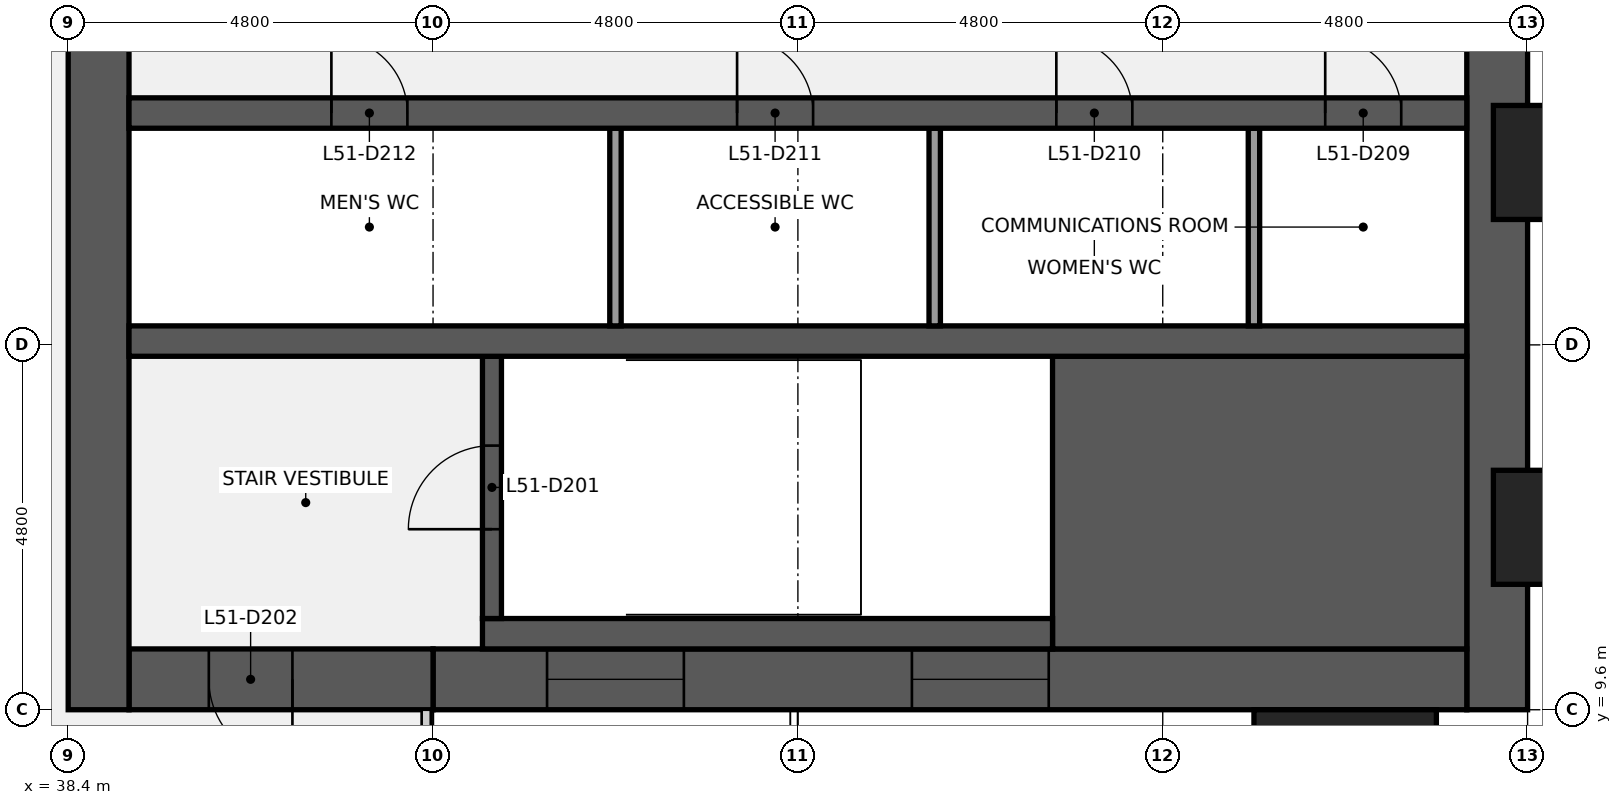
"""IFC4 building model, lengths in metres.
Left out: names, types, materials, properties, quantities, classifications, styles, units other than length and angle.
Written with IfcOpenShell. Run it as: python <this file> out.ifc"""

import sys

from ifc_helpers import new_model, si_unit, direction, frame, frame_2d, origin, origin_2d, place, context, subcontext, project, spatial, rectangle, extrude, element, fill, save


model = new_model("IFC4")
c1 = context("Model", 3, precision=1e-05, world=origin(), true_north=direction((0.0, 1.0)))
c2 = subcontext(c1, "Body", "Model", "MODEL_VIEW")
j1 = project(units=[si_unit("LENGTHUNIT", "METRE"), si_unit("PLANEANGLEUNIT", "RADIAN")], contexts=[c1])
p1 = place(None, origin())
s1 = spatial("IfcSite", under=j1, at=p1, CompositionType="ELEMENT")
p2 = place(p1, origin())
s2 = spatial("IfcBuilding", under=s1, at=p2, CompositionType="ELEMENT")
p3 = place(p2, frame((0.0, 0.0, 233.2)))
s3 = spatial("IfcBuildingStorey", under=s2, at=p3, CompositionType="ELEMENT", Elevation=233.2)
p4 = place(p3, frame((57.2, 38.4, 0.0), z_axis=(0.0, 0.0, 1.0), x_axis=(0.0, -1.0, 0.0)))
e1 = element("IfcWall", 1, at=p4, inside=s3, PredefinedType="SHEAR", context=c2, shape_type="SweptSolid", body=[
    extrude(rectangle(XDim=28.8, YDim=0.8, at=frame_2d((14.4, 0.0))), origin(), (0.0, 0.0, 1.0), 3.84),
])
p5 = place(p4, frame((18.45, 0.0, 0.9)))
e2 = element("IfcOpeningElement", 2, at=p5, cuts=e1, PredefinedType="OPENING", context=c2, shape_type="SweptSolid", body=[
    extrude(rectangle(XDim=1.5, YDim=1.5, at=frame_2d((0.75, 0.75))), frame((0.0, 0.41, 0.0), z_axis=(0.0, -1.0, 0.0), x_axis=(1.0, 0.0, 0.0)), (0.0, 0.0, 1.0), 0.82),
])
p6 = place(p4, frame((8.85, 0.0, 0.9)))
e3 = element("IfcOpeningElement", 3, at=p6, cuts=e1, PredefinedType="OPENING", context=c2, shape_type="SweptSolid", body=[
    extrude(rectangle(XDim=1.5, YDim=1.5, at=frame_2d((0.75, 0.75))), frame((0.0, 0.41, 0.0), z_axis=(0.0, -1.0, 0.0), x_axis=(1.0, 0.0, 0.0)), (0.0, 0.0, 1.0), 0.82),
])
p7 = place(p3, frame((56.8, 10.0, 0.0), z_axis=(0.0, 0.0, 1.0), x_axis=(-1.0, 0.0, 0.0)))
e4 = element("IfcWall", 4, at=p7, inside=s3, PredefinedType="SHEAR", context=c2, shape_type="SweptSolid", body=[
    extrude(rectangle(XDim=13.6, YDim=0.8, at=frame_2d((6.8, 0.0))), origin(), (0.0, 0.0, 1.0), 3.84),
])
p8 = place(p7, frame((5.5, 0.0, 0.9)))
e5 = element("IfcOpeningElement", 5, at=p8, cuts=e4, PredefinedType="OPENING", context=c2, shape_type="SweptSolid", body=[
    extrude(rectangle(XDim=1.8, YDim=1.5, at=frame_2d((0.9, 0.75))), frame((0.0, 0.41, 0.0), z_axis=(0.0, -1.0, 0.0), x_axis=(1.0, 0.0, 0.0)), (0.0, 0.0, 1.0), 0.82),
])
p9 = place(p7, frame((10.3, 0.0, 0.9)))
e6 = element("IfcOpeningElement", 6, at=p9, cuts=e4, PredefinedType="OPENING", context=c2, shape_type="SweptSolid", body=[
    extrude(rectangle(XDim=1.8, YDim=1.5, at=frame_2d((0.9, 0.75))), frame((0.0, 0.41, 0.0), z_axis=(0.0, -1.0, 0.0), x_axis=(1.0, 0.0, 0.0)), (0.0, 0.0, 1.0), 0.82),
])
p10 = place(p3, frame((43.2, 10.0, 0.0), z_axis=(0.0, 0.0, 1.0), x_axis=(-1.0, 0.0, 0.0)))
e7 = element("IfcWall", 7, at=p10, inside=s3, PredefinedType="SHEAR", context=c2, shape_type="SweptSolid", body=[
    extrude(rectangle(XDim=4.0, YDim=0.8, at=frame_2d((2.0, 0.0))), origin(), (0.0, 0.0, 1.0), 3.84),
])
p11 = place(p10, frame((1.85, 0.0, 0.0)))
e8 = element("IfcOpeningElement", 8, at=p11, cuts=e7, PredefinedType="OPENING", context=c2, shape_type="SweptSolid", body=[
    extrude(rectangle(XDim=1.1, YDim=2.1, at=frame_2d((0.55, 1.05))), frame((0.0, 0.41, 0.0), z_axis=(0.0, -1.0, 0.0), x_axis=(1.0, 0.0, 0.0)), (0.0, 0.0, 1.0), 0.82),
])
p12 = place(p3, frame((38.8, 9.6, 0.0), z_axis=(0.0, 0.0, 1.0), x_axis=(0.0, 1.0, 0.0)))
e9 = element("IfcWall", 9, at=p12, inside=s3, PredefinedType="SHEAR", context=c2, shape_type="SweptSolid", body=[
    extrude(rectangle(XDim=28.8, YDim=0.8, at=frame_2d((14.4, 0.0))), origin(), (0.0, 0.0, 1.0), 3.84),
])
p13 = place(p12, frame((8.7, 0.0, 0.0)))
e10 = element("IfcOpeningElement", 10, at=p13, cuts=e9, PredefinedType="OPENING", context=c2, shape_type="SweptSolid", body=[
    extrude(rectangle(XDim=1.8, YDim=2.1, at=frame_2d((0.9, 1.05))), frame((0.0, 0.41, 0.0), z_axis=(0.0, -1.0, 0.0), x_axis=(1.0, 0.0, 0.0)), (0.0, 0.0, 1.0), 0.82),
])
p14 = place(p12, frame((18.3, 0.0, 0.0)))
e11 = element("IfcOpeningElement", 11, at=p14, cuts=e9, PredefinedType="OPENING", context=c2, shape_type="SweptSolid", body=[
    extrude(rectangle(XDim=1.8, YDim=2.1, at=frame_2d((0.9, 1.05))), frame((0.0, 0.41, 0.0), z_axis=(0.0, -1.0, 0.0), x_axis=(1.0, 0.0, 0.0)), (0.0, 0.0, 1.0), 0.82),
])
p15 = place(p3, frame((51.35, 12.325, 0.0), z_axis=(0.0, 0.0, 1.0), x_axis=(1.0, 0.0, 0.0)))
e12 = element("IfcWall", 12, at=p15, inside=s3, PredefinedType="SHEAR", context=c2, shape_type="SweptSolid", body=[
    extrude(rectangle(XDim=5.45, YDim=3.85, at=frame_2d((2.725, 0.0))), origin(), (0.0, 0.0, 1.0), 3.84),
])
p16 = place(p3, frame((43.85, 10.6, 0.0), z_axis=(0.0, 0.0, 1.0), x_axis=(1.0, 0.0, 0.0)))
e13 = element("IfcWall", 13, at=p16, inside=s3, PredefinedType="SHEAR", context=c2, shape_type="SweptSolid", body=[
    extrude(rectangle(XDim=7.5, YDim=0.4, at=frame_2d((3.75, 0.0))), origin(), (0.0, 0.0, 1.0), 3.84),
])
p17 = place(p3, frame((43.975, 10.8, 0.0), z_axis=(0.0, 0.0, 1.0), x_axis=(0.0, 1.0, 0.0)))
e14 = element("IfcWall", 14, at=p17, inside=s3, PredefinedType="SHEAR", context=c2, shape_type="SweptSolid", body=[
    extrude(rectangle(XDim=3.45, YDim=0.25, at=frame_2d((1.725, 0.0))), origin(), (0.0, 0.0, 1.0), 3.84),
])
p18 = place(p17, frame((1.175, 0.0, 0.0)))
e15 = element("IfcOpeningElement", 15, at=p18, cuts=e14, PredefinedType="OPENING", context=c2, shape_type="SweptSolid", body=[
    extrude(rectangle(XDim=1.1, YDim=2.1, at=frame_2d((0.55, 1.05))), frame((0.0, 0.135, 0.0), z_axis=(0.0, -1.0, 0.0), x_axis=(1.0, 0.0, 0.0)), (0.0, 0.0, 1.0), 0.27),
])
p19 = place(p3, frame((39.2, 14.45, 0.0), z_axis=(0.0, 0.0, 1.0), x_axis=(1.0, 0.0, 0.0)))
e16 = element("IfcWall", 16, at=p19, inside=s3, PredefinedType="SHEAR", context=c2, shape_type="SweptSolid", body=[
    extrude(rectangle(XDim=17.6, YDim=0.4, at=frame_2d((8.8, 0.0))), origin(), (0.0, 0.0, 1.0), 3.84),
])
for number, where, z_axis, x_axis in (
    (17, (54.0, 14.65, 0.0), (0.0, 0.0, 1.0), (0.0, 1.0, 0.0)),
    (18, (49.8, 14.65, 0.0), (0.0, 0.0, 1.0), (0.0, 1.0, 0.0)),
    (19, (45.6, 14.65, 0.0), (0.0, 0.0, 1.0), (0.0, 1.0, 0.0)),
):
    element("IfcWall", number, at=place(p3, frame(where, z_axis=z_axis, x_axis=x_axis)), inside=s3, PredefinedType="PARTITIONING", context=c2, shape_type="SweptSolid", body=[
        extrude(rectangle(XDim=2.6, YDim=0.15, at=frame_2d((1.3, 0.0))), origin(), (0.0, 0.0, 1.0), 3.84),
    ])
p20 = place(p3, frame((39.2, 17.45, 0.0), z_axis=(0.0, 0.0, 1.0), x_axis=(1.0, 0.0, 0.0)))
e20 = element("IfcWall", 20, at=p20, inside=s3, PredefinedType="SHEAR", context=c2, shape_type="SweptSolid", body=[
    extrude(rectangle(XDim=17.6, YDim=0.4, at=frame_2d((8.8, 0.0))), origin(), (0.0, 0.0, 1.0), 3.84),
])
p21 = place(p20, frame((15.738, 0.0, 0.0)))
e21 = element("IfcOpeningElement", 21, at=p21, cuts=e20, PredefinedType="OPENING", context=c2, shape_type="SweptSolid", body=[
    extrude(rectangle(XDim=1.0, YDim=2.1, at=frame_2d((0.5, 1.05))), frame((0.0, 0.21, 0.0), z_axis=(0.0, -1.0, 0.0), x_axis=(1.0, 0.0, 0.0)), (0.0, 0.0, 1.0), 0.42),
])
p22 = place(p20, frame((12.2, 0.0, 0.0)))
e22 = element("IfcOpeningElement", 22, at=p22, cuts=e20, PredefinedType="OPENING", context=c2, shape_type="SweptSolid", body=[
    extrude(rectangle(XDim=1.0, YDim=2.1, at=frame_2d((0.5, 1.05))), frame((0.0, 0.21, 0.0), z_axis=(0.0, -1.0, 0.0), x_axis=(1.0, 0.0, 0.0)), (0.0, 0.0, 1.0), 0.42),
])
p23 = place(p20, frame((8.0, 0.0, 0.0)))
e23 = element("IfcOpeningElement", 23, at=p23, cuts=e20, PredefinedType="OPENING", context=c2, shape_type="SweptSolid", body=[
    extrude(rectangle(XDim=1.0, YDim=2.1, at=frame_2d((0.5, 1.05))), frame((0.0, 0.21, 0.0), z_axis=(0.0, -1.0, 0.0), x_axis=(1.0, 0.0, 0.0)), (0.0, 0.0, 1.0), 0.42),
])
p24 = place(p20, frame((2.663, 0.0, 0.0)))
e24 = element("IfcOpeningElement", 24, at=p24, cuts=e20, PredefinedType="OPENING", context=c2, shape_type="SweptSolid", body=[
    extrude(rectangle(XDim=1.0, YDim=2.1, at=frame_2d((0.5, 1.05))), frame((0.0, 0.21, 0.0), z_axis=(0.0, -1.0, 0.0), x_axis=(1.0, 0.0, 0.0)), (0.0, 0.0, 1.0), 0.42),
])
for number, where, z_axis, x_axis in (
    (25, (55.2, 8.85, 0.0), (0.0, 0.0, 1.0), (1.0, 0.0, 0.0)),
    (26, (58.35, 12.0, 0.0), (0.0, 0.0, 1.0), (0.0, 1.0, 0.0)),
    (27, (58.35, 16.8, 0.0), (0.0, 0.0, 1.0), (0.0, 1.0, 0.0)),
):
    element("IfcColumn", number, at=place(p3, frame(where, z_axis=z_axis, x_axis=x_axis)), inside=s3, PredefinedType="PILASTER", context=c2, shape_type="SweptSolid", body=[
        extrude(rectangle(XDim=2.4, YDim=1.5, at=origin_2d()), origin(), (0.0, 0.0, 1.0), 4.0),
    ])
p25 = place(p18, origin())
e28 = element("IfcDoor", 28, at=p25, inside=s3, OperationType="SINGLE_SWING_LEFT", PredefinedType="DOOR", context=c2, shape_type="SweptSolid", body=[
    extrude(rectangle(XDim=1.1, YDim=2.1, at=frame_2d((0.55, 1.05))), frame((0.0, 0.025, 0.0), z_axis=(0.0, -1.0, 0.0), x_axis=(1.0, 0.0, 0.0)), (0.0, 0.0, 1.0), 0.05),
])
fill(e15, e28)
p26 = place(p11, origin())
e29 = element("IfcDoor", 29, at=p26, inside=s3, OperationType="SINGLE_SWING_LEFT", PredefinedType="DOOR", context=c2, shape_type="SweptSolid", body=[
    extrude(rectangle(XDim=1.1, YDim=2.1, at=frame_2d((0.55, 1.05))), frame((0.0, 0.025, 0.0), z_axis=(0.0, -1.0, 0.0), x_axis=(1.0, 0.0, 0.0)), (0.0, 0.0, 1.0), 0.05),
])
fill(e8, e29)
p27 = place(p21, origin())
e30 = element("IfcDoor", 30, at=p27, inside=s3, OperationType="SINGLE_SWING_LEFT", PredefinedType="DOOR", context=c2, shape_type="SweptSolid", body=[
    extrude(rectangle(XDim=1.0, YDim=2.1, at=frame_2d((0.5, 1.05))), frame((0.0, 0.025, 0.0), z_axis=(0.0, -1.0, 0.0), x_axis=(1.0, 0.0, 0.0)), (0.0, 0.0, 1.0), 0.05),
])
fill(e21, e30)
p28 = place(p22, origin())
e31 = element("IfcDoor", 31, at=p28, inside=s3, OperationType="SINGLE_SWING_LEFT", PredefinedType="DOOR", context=c2, shape_type="SweptSolid", body=[
    extrude(rectangle(XDim=1.0, YDim=2.1, at=frame_2d((0.5, 1.05))), frame((0.0, 0.025, 0.0), z_axis=(0.0, -1.0, 0.0), x_axis=(1.0, 0.0, 0.0)), (0.0, 0.0, 1.0), 0.05),
])
fill(e22, e31)
p29 = place(p23, origin())
e32 = element("IfcDoor", 32, at=p29, inside=s3, OperationType="SINGLE_SWING_LEFT", PredefinedType="DOOR", context=c2, shape_type="SweptSolid", body=[
    extrude(rectangle(XDim=1.0, YDim=2.1, at=frame_2d((0.5, 1.05))), frame((0.0, 0.025, 0.0), z_axis=(0.0, -1.0, 0.0), x_axis=(1.0, 0.0, 0.0)), (0.0, 0.0, 1.0), 0.05),
])
fill(e23, e32)
p30 = place(p24, origin())
e33 = element("IfcDoor", 33, at=p30, inside=s3, OperationType="SINGLE_SWING_LEFT", PredefinedType="DOOR", context=c2, shape_type="SweptSolid", body=[
    extrude(rectangle(XDim=1.0, YDim=2.1, at=frame_2d((0.5, 1.05))), frame((0.0, 0.025, 0.0), z_axis=(0.0, -1.0, 0.0), x_axis=(1.0, 0.0, 0.0)), (0.0, 0.0, 1.0), 0.05),
])
fill(e24, e33)
p31 = place(p8, origin())
e34 = element("IfcWindow", 34, at=p31, inside=s3, PartitioningType="SINGLE_PANEL", PredefinedType="WINDOW", context=c2, shape_type="SweptSolid", body=[
    extrude(rectangle(XDim=1.8, YDim=1.5, at=frame_2d((0.9, 0.75))), frame((0.0, 0.03, 0.0), z_axis=(0.0, -1.0, 0.0), x_axis=(1.0, 0.0, 0.0)), (0.0, 0.0, 1.0), 0.06),
])
fill(e5, e34)
p32 = place(p9, origin())
e35 = element("IfcWindow", 35, at=p32, inside=s3, PartitioningType="SINGLE_PANEL", PredefinedType="WINDOW", context=c2, shape_type="SweptSolid", body=[
    extrude(rectangle(XDim=1.8, YDim=1.5, at=frame_2d((0.9, 0.75))), frame((0.0, 0.03, 0.0), z_axis=(0.0, -1.0, 0.0), x_axis=(1.0, 0.0, 0.0)), (0.0, 0.0, 1.0), 0.06),
])
fill(e6, e35)
save(model, sys.argv[1])
